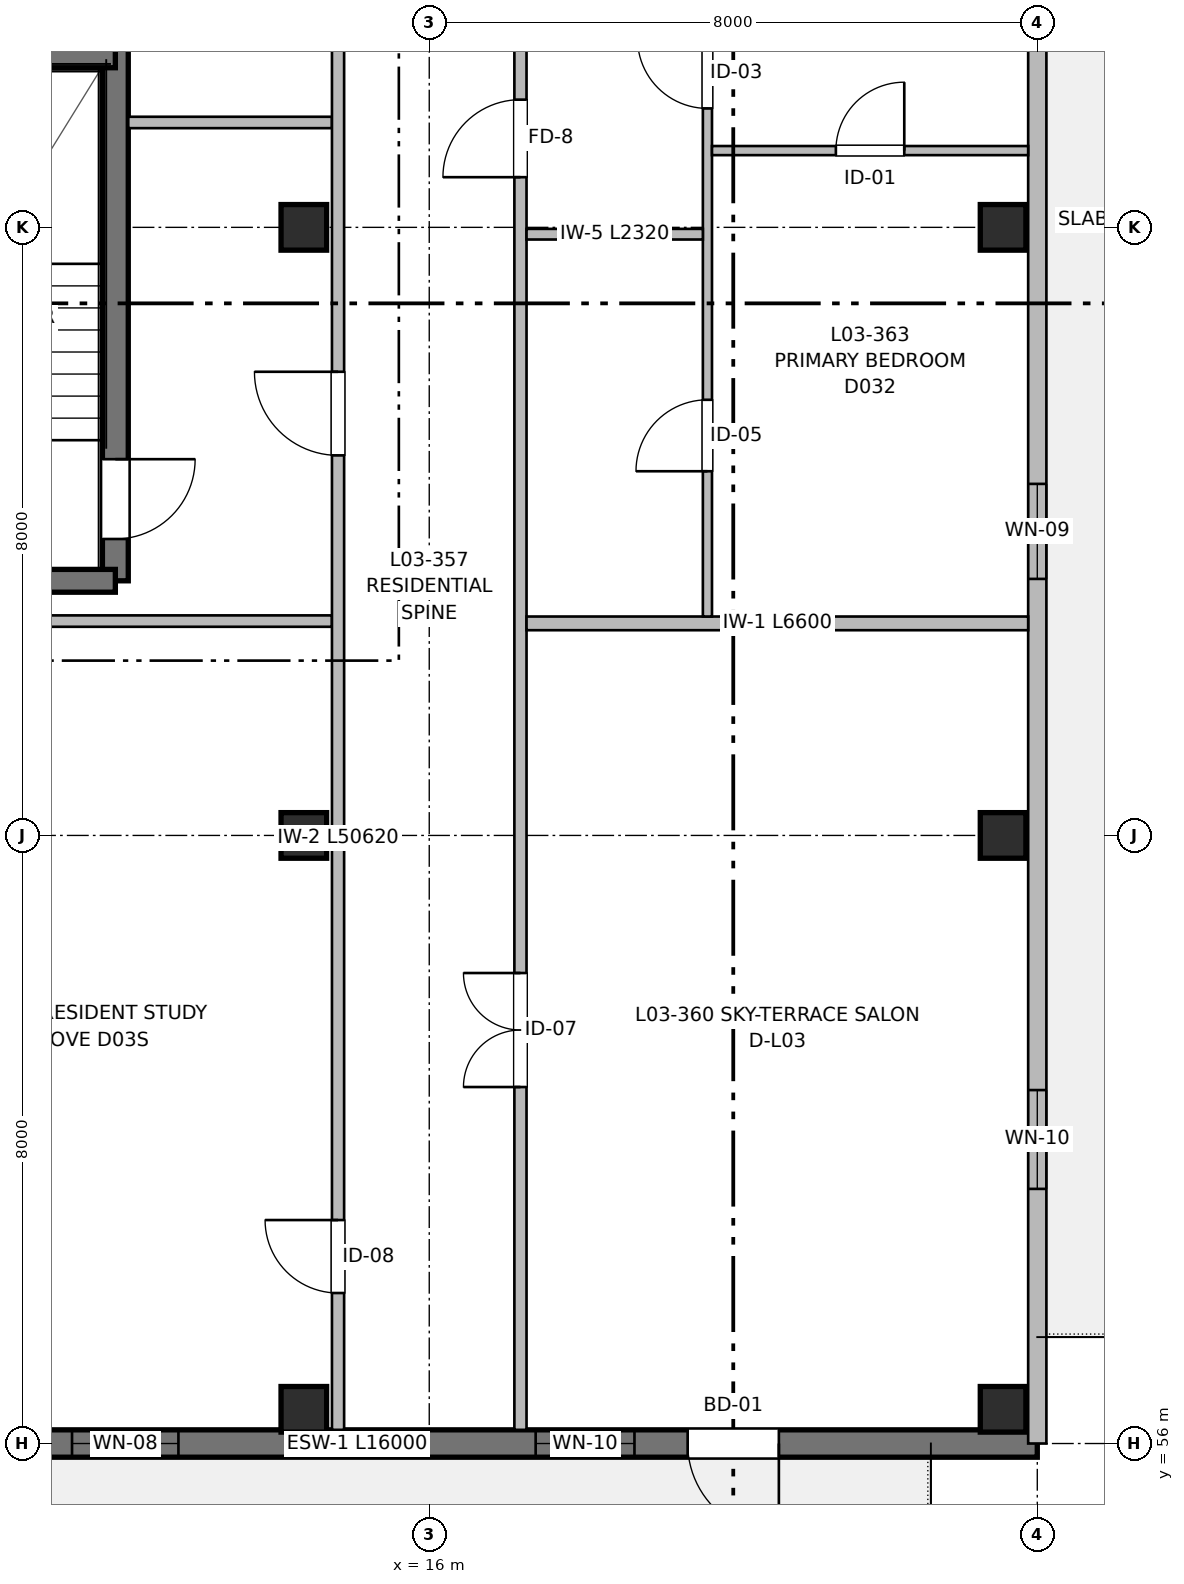
"""IFC4 building model, lengths in metres.
Left out: names, types, materials, properties, quantities, classifications, styles, units other than length and angle.
Written with IfcOpenShell. Run it as: python <this file> out.ifc"""

import sys

from ifc_helpers import new_model, si_unit, direction, frame, frame_2d, origin, origin_2d, place, context, subcontext, project, spatial, rectangle, extrude, element, fill, save


model = new_model("IFC4")
c1 = context("Model", 3, precision=1e-05, world=origin(), true_north=direction((0.0, 1.0)))
c2 = subcontext(c1, "Body", "Model", "MODEL_VIEW")
j1 = project(units=[si_unit("LENGTHUNIT", "METRE"), si_unit("PLANEANGLEUNIT", "RADIAN")], contexts=[c1])
p1 = place(None, origin())
s1 = spatial("IfcSite", under=j1, at=p1, CompositionType="ELEMENT")
p2 = place(p1, origin())
s2 = spatial("IfcBuilding", under=s1, at=p2, CompositionType="ELEMENT")
p3 = place(p2, frame((0.0, 0.0, 10.56)))
s3 = spatial("IfcBuildingStorey", under=s2, at=p3, CompositionType="ELEMENT", Elevation=10.56)
for number, where, z_axis, x_axis in (
    (1, (14.35, 56.45, 0.0), (0.0, 0.0, 1.0), (1.0, 0.0, 0.0)),
    (2, (14.35, 64.0, 0.0), (0.0, 0.0, 1.0), (1.0, 0.0, 0.0)),
    (3, (14.35, 72.0, 0.0), (0.0, 0.0, 1.0), (1.0, 0.0, 0.0)),
    (4, (23.55, 56.45, 0.0), (0.0, 0.0, 1.0), (1.0, 0.0, 0.0)),
    (5, (23.55, 64.0, 0.0), (0.0, 0.0, 1.0), (1.0, 0.0, 0.0)),
    (6, (23.55, 72.0, 0.0), (0.0, 0.0, 1.0), (1.0, 0.0, 0.0)),
):
    element("IfcColumn", number, at=place(p3, frame(where, z_axis=z_axis, x_axis=x_axis)), inside=s3, PredefinedType="COLUMN", context=c2, shape_type="SweptSolid", body=[
        extrude(rectangle(XDim=0.6, YDim=0.6, at=origin_2d()), origin(), (0.0, 0.0, 1.0), 3.2),
    ])
p4 = place(p3, frame((11.87, 79.8, 0.0), z_axis=(0.0, 0.0, 1.0), x_axis=(0.0, -1.0, 0.0)))
e7 = element("IfcWall", 7, at=p4, inside=s3, PredefinedType="SHEAR", context=c2, shape_type="SweptSolid", body=[
    extrude(rectangle(XDim=12.45, YDim=0.34, at=frame_2d((6.225, 0.0))), origin(), (0.0, 0.0, 1.0), 3.2),
])
p5 = place(p4, frame((10.85, 0.0, 0.0)))
e8 = element("IfcOpeningElement", 8, at=p5, cuts=e7, PredefinedType="OPENING", context=c2, shape_type="SweptSolid", body=[
    extrude(rectangle(XDim=1.05, YDim=2.15, at=frame_2d((0.525, 1.075))), frame((0.0, 0.18, 0.0), z_axis=(0.0, -1.0, 0.0), x_axis=(1.0, 0.0, 0.0)), (0.0, 0.0, 1.0), 0.36),
])
p6 = place(p3, frame((11.87, 67.35, 0.0), z_axis=(0.0, 0.0, 1.0), x_axis=(-1.0, 0.0, 0.0)))
e9 = element("IfcWall", 9, at=p6, inside=s3, PredefinedType="SHEAR", context=c2, shape_type="SweptSolid", body=[
    extrude(rectangle(XDim=3.41, YDim=0.3, at=frame_2d((1.705, 0.0))), origin(), (0.0, 0.0, 1.0), 3.2),
])
p7 = place(p3, frame((8.46, 74.24, 0.0), z_axis=(0.0, 0.0, 1.0), x_axis=(1.0, 0.0, 0.0)))
e10 = element("IfcWall", 10, at=p7, inside=s3, PredefinedType="SHEAR", context=c2, shape_type="SweptSolid", body=[
    extrude(rectangle(XDim=3.41, YDim=0.28, at=frame_2d((1.705, 0.0))), origin(), (0.0, 0.0, 1.0), 3.2),
])
p8 = place(p3, frame((24.0, 56.0, 0.0), z_axis=(0.0, 0.0, 1.0), x_axis=(-1.0, 0.0, 0.0)))
e11 = element("IfcWall", 11, at=p8, inside=s3, PredefinedType="SHEAR", context=c2, shape_type="SweptSolid", body=[
    extrude(rectangle(XDim=16.0, YDim=0.36, at=frame_2d((8.0, 0.0))), origin(), (0.0, 0.0, 1.0), 2.98),
])
p9 = place(p8, frame((3.4, 0.0, 0.0)))
e12 = element("IfcOpeningElement", 12, at=p9, cuts=e11, PredefinedType="OPENING", context=c2, shape_type="SweptSolid", body=[
    extrude(rectangle(XDim=1.2, YDim=2.2, at=frame_2d((0.6, 1.1))), frame((0.0, 0.19, 0.0), z_axis=(0.0, -1.0, 0.0), x_axis=(1.0, 0.0, 0.0)), (0.0, 0.0, 1.0), 0.38),
])
p10 = place(p8, frame((5.3, 0.0, 0.82)))
e13 = element("IfcOpeningElement", 13, at=p10, cuts=e11, PredefinedType="OPENING", context=c2, shape_type="SweptSolid", body=[
    extrude(rectangle(XDim=1.3, YDim=1.4, at=frame_2d((0.65, 0.7))), frame((0.0, 0.19, 0.0), z_axis=(0.0, -1.0, 0.0), x_axis=(1.0, 0.0, 0.0)), (0.0, 0.0, 1.0), 0.38),
])
p11 = place(p8, frame((11.3, 0.0, 0.87)))
e14 = element("IfcOpeningElement", 14, at=p11, cuts=e11, PredefinedType="OPENING", context=c2, shape_type="SweptSolid", body=[
    extrude(rectangle(XDim=1.4, YDim=1.35, at=frame_2d((0.7, 0.675))), frame((0.0, 0.19, 0.0), z_axis=(0.0, -1.0, 0.0), x_axis=(1.0, 0.0, 0.0)), (0.0, 0.0, 1.0), 0.38),
])
p12 = place(p3, frame((24.0, 88.0, 0.0), z_axis=(0.0, 0.0, 1.0), x_axis=(0.0, -1.0, 0.0)))
e15 = element("IfcWall", 15, at=p12, inside=s3, PredefinedType="SOLIDWALL", context=c2, shape_type="SweptSolid", body=[
    extrude(rectangle(XDim=32.0, YDim=0.24, at=frame_2d((16.0, 0.0))), origin(), (0.0, 0.0, 1.0), 2.98),
])
p13 = place(p12, frame((3.4, 0.0, 0.0)))
e16 = element("IfcOpeningElement", 16, at=p13, cuts=e15, PredefinedType="OPENING", context=c2, shape_type="SweptSolid", body=[
    extrude(rectangle(XDim=1.2, YDim=2.2, at=frame_2d((0.6, 1.1))), frame((0.0, 0.13, 0.0), z_axis=(0.0, -1.0, 0.0), x_axis=(1.0, 0.0, 0.0)), (0.0, 0.0, 1.0), 0.26),
])
p14 = place(p12, frame((6.15, 0.0, 0.82)))
e17 = element("IfcOpeningElement", 17, at=p14, cuts=e15, PredefinedType="OPENING", context=c2, shape_type="SweptSolid", body=[
    extrude(rectangle(XDim=1.3, YDim=1.4, at=frame_2d((0.65, 0.7))), frame((0.0, 0.13, 0.0), z_axis=(0.0, -1.0, 0.0), x_axis=(1.0, 0.0, 0.0)), (0.0, 0.0, 1.0), 0.26),
])
p15 = place(p12, frame((11.3, 0.0, 0.87)))
e18 = element("IfcOpeningElement", 18, at=p15, cuts=e15, PredefinedType="OPENING", context=c2, shape_type="SweptSolid", body=[
    extrude(rectangle(XDim=1.4, YDim=1.35, at=frame_2d((0.7, 0.675))), frame((0.0, 0.13, 0.0), z_axis=(0.0, -1.0, 0.0), x_axis=(1.0, 0.0, 0.0)), (0.0, 0.0, 1.0), 0.26),
])
p16 = place(p12, frame((19.375, 0.0, 0.87)))
e19 = element("IfcOpeningElement", 19, at=p16, cuts=e15, PredefinedType="OPENING", context=c2, shape_type="SweptSolid", body=[
    extrude(rectangle(XDim=1.25, YDim=1.35, at=frame_2d((0.625, 0.675))), frame((0.0, 0.13, 0.0), z_axis=(0.0, -1.0, 0.0), x_axis=(1.0, 0.0, 0.0)), (0.0, 0.0, 1.0), 0.26),
])
p17 = place(p12, frame((27.35, 0.0, 0.82)))
e20 = element("IfcOpeningElement", 20, at=p17, cuts=e15, PredefinedType="OPENING", context=c2, shape_type="SweptSolid", body=[
    extrude(rectangle(XDim=1.3, YDim=1.4, at=frame_2d((0.65, 0.7))), frame((0.0, 0.13, 0.0), z_axis=(0.0, -1.0, 0.0), x_axis=(1.0, 0.0, 0.0)), (0.0, 0.0, 1.0), 0.26),
])
p18 = place(p3, frame((8.12, 66.82, 0.0), z_axis=(0.0, 0.0, 1.0), x_axis=(1.0, 0.0, 0.0)))
e21 = element("IfcWall", 21, at=p18, inside=s3, PredefinedType="PARTITIONING", context=c2, shape_type="SweptSolid", body=[
    extrude(rectangle(XDim=6.6, YDim=0.15, at=frame_2d((3.3, 0.0))), origin(), (0.0, 0.0, 1.0), 2.935),
])
p19 = place(p3, frame((12.04, 73.38, 0.0), z_axis=(0.0, 0.0, 1.0), x_axis=(1.0, 0.0, 0.0)))
e22 = element("IfcWall", 22, at=p19, inside=s3, PredefinedType="PARTITIONING", context=c2, shape_type="SweptSolid", body=[
    extrude(rectangle(XDim=2.68, YDim=0.15, at=frame_2d((1.34, 0.0))), origin(), (0.0, 0.0, 1.0), 2.935),
])
p20 = place(p3, frame((14.8, 56.18, 0.0), z_axis=(0.0, 0.0, 1.0), x_axis=(0.0, 1.0, 0.0)))
e23 = element("IfcWall", 23, at=p20, inside=s3, PredefinedType="PARTITIONING", context=c2, shape_type="SweptSolid", body=[
    extrude(rectangle(XDim=50.62, YDim=0.16, at=frame_2d((25.31, 0.0))), origin(), (0.0, 0.0, 1.0), 2.935),
])
p21 = place(p20, frame((12.82, 0.0, 0.0)))
e24 = element("IfcOpeningElement", 24, at=p21, cuts=e23, PredefinedType="OPENING", context=c2, shape_type="SweptSolid", body=[
    extrude(rectangle(XDim=1.1, YDim=2.15, at=frame_2d((0.55, 1.075))), frame((0.0, 0.09, 0.0), z_axis=(0.0, -1.0, 0.0), x_axis=(1.0, 0.0, 0.0)), (0.0, 0.0, 1.0), 0.18),
])
p22 = place(p20, frame((19.22, 0.0, 0.0)))
e25 = element("IfcOpeningElement", 25, at=p22, cuts=e23, PredefinedType="OPENING", context=c2, shape_type="SweptSolid", body=[
    extrude(rectangle(XDim=1.6, YDim=2.15, at=frame_2d((0.8, 1.075))), frame((0.0, 0.09, 0.0), z_axis=(0.0, -1.0, 0.0), x_axis=(1.0, 0.0, 0.0)), (0.0, 0.0, 1.0), 0.18),
])
p23 = place(p20, frame((1.8, 0.0, 0.0)))
e26 = element("IfcOpeningElement", 26, at=p23, cuts=e23, PredefinedType="OPENING", context=c2, shape_type="SweptSolid", body=[
    extrude(rectangle(XDim=0.96, YDim=2.15, at=frame_2d((0.48, 1.075))), frame((0.0, 0.09, 0.0), z_axis=(0.0, -1.0, 0.0), x_axis=(1.0, 0.0, 0.0)), (0.0, 0.0, 1.0), 0.18),
])
p24 = place(p20, frame((32.825, 0.0, 0.0)))
e27 = element("IfcOpeningElement", 27, at=p24, cuts=e23, PredefinedType="OPENING", context=c2, shape_type="SweptSolid", body=[
    extrude(rectangle(XDim=0.98, YDim=2.15, at=frame_2d((0.49, 1.075))), frame((0.0, 0.09, 0.0), z_axis=(0.0, -1.0, 0.0), x_axis=(1.0, 0.0, 0.0)), (0.0, 0.0, 1.0), 0.18),
])
p25 = place(p20, frame((40.635, 0.0, 0.0)))
e28 = element("IfcOpeningElement", 28, at=p25, cuts=e23, PredefinedType="OPENING", context=c2, shape_type="SweptSolid", body=[
    extrude(rectangle(XDim=0.98, YDim=2.15, at=frame_2d((0.49, 1.075))), frame((0.0, 0.09, 0.0), z_axis=(0.0, -1.0, 0.0), x_axis=(1.0, 0.0, 0.0)), (0.0, 0.0, 1.0), 0.18),
])
p26 = place(p3, frame((17.2, 56.18, 0.0), z_axis=(0.0, 0.0, 1.0), x_axis=(0.0, 1.0, 0.0)))
e29 = element("IfcWall", 29, at=p26, inside=s3, PredefinedType="PARTITIONING", context=c2, shape_type="SweptSolid", body=[
    extrude(rectangle(XDim=50.62, YDim=0.16, at=frame_2d((25.31, 0.0))), origin(), (0.0, 0.0, 1.0), 2.935),
])
p27 = place(p26, frame((4.51, 0.0, 0.0)))
e30 = element("IfcOpeningElement", 30, at=p27, cuts=e29, PredefinedType="OPENING", context=c2, shape_type="SweptSolid", body=[
    extrude(rectangle(XDim=1.5, YDim=2.2, at=frame_2d((0.75, 1.1))), frame((0.0, 0.09, 0.0), z_axis=(0.0, -1.0, 0.0), x_axis=(1.0, 0.0, 0.0)), (0.0, 0.0, 1.0), 0.18),
])
p28 = place(p26, frame((16.48, 0.0, 0.0)))
e31 = element("IfcOpeningElement", 31, at=p28, cuts=e29, PredefinedType="OPENING", context=c2, shape_type="SweptSolid", body=[
    extrude(rectangle(XDim=1.02, YDim=2.15, at=frame_2d((0.51, 1.075))), frame((0.0, 0.09, 0.0), z_axis=(0.0, -1.0, 0.0), x_axis=(1.0, 0.0, 0.0)), (0.0, 0.0, 1.0), 0.18),
])
p29 = place(p26, frame((28.53, 0.0, 0.0)))
e32 = element("IfcOpeningElement", 32, at=p29, cuts=e29, PredefinedType="OPENING", context=c2, shape_type="SweptSolid", body=[
    extrude(rectangle(XDim=0.98, YDim=2.15, at=frame_2d((0.49, 1.075))), frame((0.0, 0.09, 0.0), z_axis=(0.0, -1.0, 0.0), x_axis=(1.0, 0.0, 0.0)), (0.0, 0.0, 1.0), 0.18),
])
p30 = place(p26, frame((42.88, 0.0, 0.0)))
e33 = element("IfcOpeningElement", 33, at=p30, cuts=e29, PredefinedType="OPENING", context=c2, shape_type="SweptSolid", body=[
    extrude(rectangle(XDim=0.98, YDim=2.15, at=frame_2d((0.49, 1.075))), frame((0.0, 0.09, 0.0), z_axis=(0.0, -1.0, 0.0), x_axis=(1.0, 0.0, 0.0)), (0.0, 0.0, 1.0), 0.18),
])
p31 = place(p3, frame((17.28, 66.79, 0.0), z_axis=(0.0, 0.0, 1.0), x_axis=(1.0, 0.0, 0.0)))
e34 = element("IfcWall", 34, at=p31, inside=s3, PredefinedType="PARTITIONING", context=c2, shape_type="SweptSolid", body=[
    extrude(rectangle(XDim=6.6, YDim=0.18, at=frame_2d((3.3, 0.0))), origin(), (0.0, 0.0, 1.0), 2.935),
])
p32 = place(p3, frame((19.66, 66.88, 0.0), z_axis=(0.0, 0.0, 1.0), x_axis=(0.0, 1.0, 0.0)))
e35 = element("IfcWall", 35, at=p32, inside=s3, PredefinedType="PARTITIONING", context=c2, shape_type="SweptSolid", body=[
    extrude(rectangle(XDim=10.94, YDim=0.12, at=frame_2d((5.47, 0.0))), origin(), (0.0, 0.0, 1.0), 2.935),
])
p33 = place(p32, frame((1.911, 0.0, 0.0)))
e36 = element("IfcOpeningElement", 36, at=p33, cuts=e35, PredefinedType="OPENING", context=c2, shape_type="SweptSolid", body=[
    extrude(rectangle(XDim=0.94, YDim=2.1, at=frame_2d((0.47, 1.05))), frame((0.0, 0.07, 0.0), z_axis=(0.0, -1.0, 0.0), x_axis=(1.0, 0.0, 0.0)), (0.0, 0.0, 1.0), 0.14),
])
p34 = place(p32, frame((6.685, 0.0, 0.0)))
e37 = element("IfcOpeningElement", 37, at=p34, cuts=e35, PredefinedType="OPENING", context=c2, shape_type="SweptSolid", body=[
    extrude(rectangle(XDim=0.92, YDim=2.1, at=frame_2d((0.46, 1.05))), frame((0.0, 0.07, 0.0), z_axis=(0.0, -1.0, 0.0), x_axis=(1.0, 0.0, 0.0)), (0.0, 0.0, 1.0), 0.14),
])
p35 = place(p3, frame((17.28, 71.91, 0.0), z_axis=(0.0, 0.0, 1.0), x_axis=(1.0, 0.0, 0.0)))
e38 = element("IfcWall", 38, at=p35, inside=s3, PredefinedType="PARTITIONING", context=c2, shape_type="SweptSolid", body=[
    extrude(rectangle(XDim=2.32, YDim=0.14, at=frame_2d((1.16, 0.0))), origin(), (0.0, 0.0, 1.0), 2.53),
])
p36 = place(p3, frame((19.72, 73.01, 0.0), z_axis=(0.0, 0.0, 1.0), x_axis=(1.0, 0.0, 0.0)))
e39 = element("IfcWall", 39, at=p36, inside=s3, PredefinedType="PARTITIONING", context=c2, shape_type="SweptSolid", body=[
    extrude(rectangle(XDim=4.16, YDim=0.12, at=frame_2d((2.08, 0.0))), origin(), (0.0, 0.0, 1.0), 2.935),
])
p37 = place(p36, frame((1.63, 0.0, 0.0)))
e40 = element("IfcOpeningElement", 40, at=p37, cuts=e39, PredefinedType="OPENING", context=c2, shape_type="SweptSolid", body=[
    extrude(rectangle(XDim=0.9, YDim=2.1, at=frame_2d((0.45, 1.05))), frame((0.0, 0.07, 0.0), z_axis=(0.0, -1.0, 0.0), x_axis=(1.0, 0.0, 0.0)), (0.0, 0.0, 1.0), 0.14),
])
p38 = place(p5, origin())
e41 = element("IfcDoor", 41, at=p38, inside=s3, OperationType="SINGLE_SWING_LEFT", PredefinedType="DOOR", context=c2, shape_type="SweptSolid", body=[
    extrude(rectangle(XDim=1.05, YDim=2.15, at=frame_2d((0.525, 1.075))), frame((0.0, 0.025, 0.0), z_axis=(0.0, -1.0, 0.0), x_axis=(1.0, 0.0, 0.0)), (0.0, 0.0, 1.0), 0.05),
])
fill(e8, e41)
p39 = place(p9, origin())
e42 = element("IfcDoor", 42, at=p39, inside=s3, OperationType="SINGLE_SWING_LEFT", PredefinedType="DOOR", context=c2, shape_type="SweptSolid", body=[
    extrude(rectangle(XDim=1.2, YDim=2.2, at=frame_2d((0.6, 1.1))), frame((0.0, 0.025, 0.0), z_axis=(0.0, -1.0, 0.0), x_axis=(1.0, 0.0, 0.0)), (0.0, 0.0, 1.0), 0.05),
])
fill(e12, e42)
p40 = place(p10, origin())
e43 = element("IfcWindow", 43, at=p40, inside=s3, PartitioningType="SINGLE_PANEL", PredefinedType="WINDOW", context=c2, shape_type="SweptSolid", body=[
    extrude(rectangle(XDim=1.3, YDim=1.4, at=frame_2d((0.65, 0.7))), frame((0.0, 0.03, 0.0), z_axis=(0.0, -1.0, 0.0), x_axis=(1.0, 0.0, 0.0)), (0.0, 0.0, 1.0), 0.06),
])
fill(e13, e43)
p41 = place(p11, origin())
e44 = element("IfcWindow", 44, at=p41, inside=s3, PartitioningType="SINGLE_PANEL", PredefinedType="WINDOW", context=c2, shape_type="SweptSolid", body=[
    extrude(rectangle(XDim=1.4, YDim=1.35, at=frame_2d((0.7, 0.675))), frame((0.0, 0.03, 0.0), z_axis=(0.0, -1.0, 0.0), x_axis=(1.0, 0.0, 0.0)), (0.0, 0.0, 1.0), 0.06),
])
fill(e14, e44)
p42 = place(p16, origin())
e45 = element("IfcWindow", 45, at=p42, inside=s3, PartitioningType="SINGLE_PANEL", PredefinedType="WINDOW", context=c2, shape_type="SweptSolid", body=[
    extrude(rectangle(XDim=1.25, YDim=1.35, at=frame_2d((0.625, 0.675))), frame((0.0, 0.03, 0.0), z_axis=(0.0, -1.0, 0.0), x_axis=(1.0, 0.0, 0.0)), (0.0, 0.0, 1.0), 0.06),
])
fill(e19, e45)
p43 = place(p17, origin())
e46 = element("IfcWindow", 46, at=p43, inside=s3, PartitioningType="SINGLE_PANEL", PredefinedType="WINDOW", context=c2, shape_type="SweptSolid", body=[
    extrude(rectangle(XDim=1.3, YDim=1.4, at=frame_2d((0.65, 0.7))), frame((0.0, 0.03, 0.0), z_axis=(0.0, -1.0, 0.0), x_axis=(1.0, 0.0, 0.0)), (0.0, 0.0, 1.0), 0.06),
])
fill(e20, e46)
p44 = place(p21, origin())
e47 = element("IfcDoor", 47, at=p44, inside=s3, OperationType="SINGLE_SWING_RIGHT", PredefinedType="DOOR", context=c2, shape_type="SweptSolid", body=[
    extrude(rectangle(XDim=1.1, YDim=2.15, at=frame_2d((0.55, 1.075))), frame((0.0, 0.025, 0.0), z_axis=(0.0, -1.0, 0.0), x_axis=(1.0, 0.0, 0.0)), (0.0, 0.0, 1.0), 0.05),
])
fill(e24, e47)
p45 = place(p27, origin())
e48 = element("IfcDoor", 48, at=p45, inside=s3, OperationType="DOUBLE_DOOR_SINGLE_SWING", PredefinedType="DOOR", context=c2, shape_type="SweptSolid", body=[
    extrude(rectangle(XDim=1.5, YDim=2.2, at=frame_2d((0.75, 1.1))), frame((0.0, 0.025, 0.0), z_axis=(0.0, -1.0, 0.0), x_axis=(1.0, 0.0, 0.0)), (0.0, 0.0, 1.0), 0.05),
])
fill(e30, e48)
p46 = place(p33, origin())
e49 = element("IfcDoor", 49, at=p46, inside=s3, OperationType="SINGLE_SWING_LEFT", PredefinedType="DOOR", context=c2, shape_type="SweptSolid", body=[
    extrude(rectangle(XDim=0.94, YDim=2.1, at=frame_2d((0.47, 1.05))), frame((0.0, 0.025, 0.0), z_axis=(0.0, -1.0, 0.0), x_axis=(1.0, 0.0, 0.0)), (0.0, 0.0, 1.0), 0.05),
])
fill(e36, e49)
p47 = place(p34, origin())
e50 = element("IfcDoor", 50, at=p47, inside=s3, OperationType="SINGLE_SWING_RIGHT", PredefinedType="DOOR", context=c2, shape_type="SweptSolid", body=[
    extrude(rectangle(XDim=0.92, YDim=2.1, at=frame_2d((0.46, 1.05))), frame((0.0, 0.025, 0.0), z_axis=(0.0, -1.0, 0.0), x_axis=(1.0, 0.0, 0.0)), (0.0, 0.0, 1.0), 0.05),
])
fill(e37, e50)
p48 = place(p28, origin())
e51 = element("IfcDoor", 51, at=p48, inside=s3, OperationType="SINGLE_SWING_LEFT", PredefinedType="DOOR", context=c2, shape_type="SweptSolid", body=[
    extrude(rectangle(XDim=1.02, YDim=2.15, at=frame_2d((0.51, 1.075))), frame((0.0, 0.025, 0.0), z_axis=(0.0, -1.0, 0.0), x_axis=(1.0, 0.0, 0.0)), (0.0, 0.0, 1.0), 0.05),
])
fill(e31, e51)
p49 = place(p37, origin())
e52 = element("IfcDoor", 52, at=p49, inside=s3, OperationType="SINGLE_SWING_RIGHT", PredefinedType="DOOR", context=c2, shape_type="SweptSolid", body=[
    extrude(rectangle(XDim=0.9, YDim=2.1, at=frame_2d((0.45, 1.05))), frame((0.0, 0.025, 0.0), z_axis=(0.0, -1.0, 0.0), x_axis=(1.0, 0.0, 0.0)), (0.0, 0.0, 1.0), 0.05),
])
fill(e40, e52)
p50 = place(p23, origin())
e53 = element("IfcDoor", 53, at=p50, inside=s3, OperationType="SINGLE_SWING_RIGHT", PredefinedType="DOOR", context=c2, shape_type="SweptSolid", body=[
    extrude(rectangle(XDim=0.96, YDim=2.15, at=frame_2d((0.48, 1.075))), frame((0.0, 0.025, 0.0), z_axis=(0.0, -1.0, 0.0), x_axis=(1.0, 0.0, 0.0)), (0.0, 0.0, 1.0), 0.05),
])
fill(e26, e53)
save(model, sys.argv[1])
